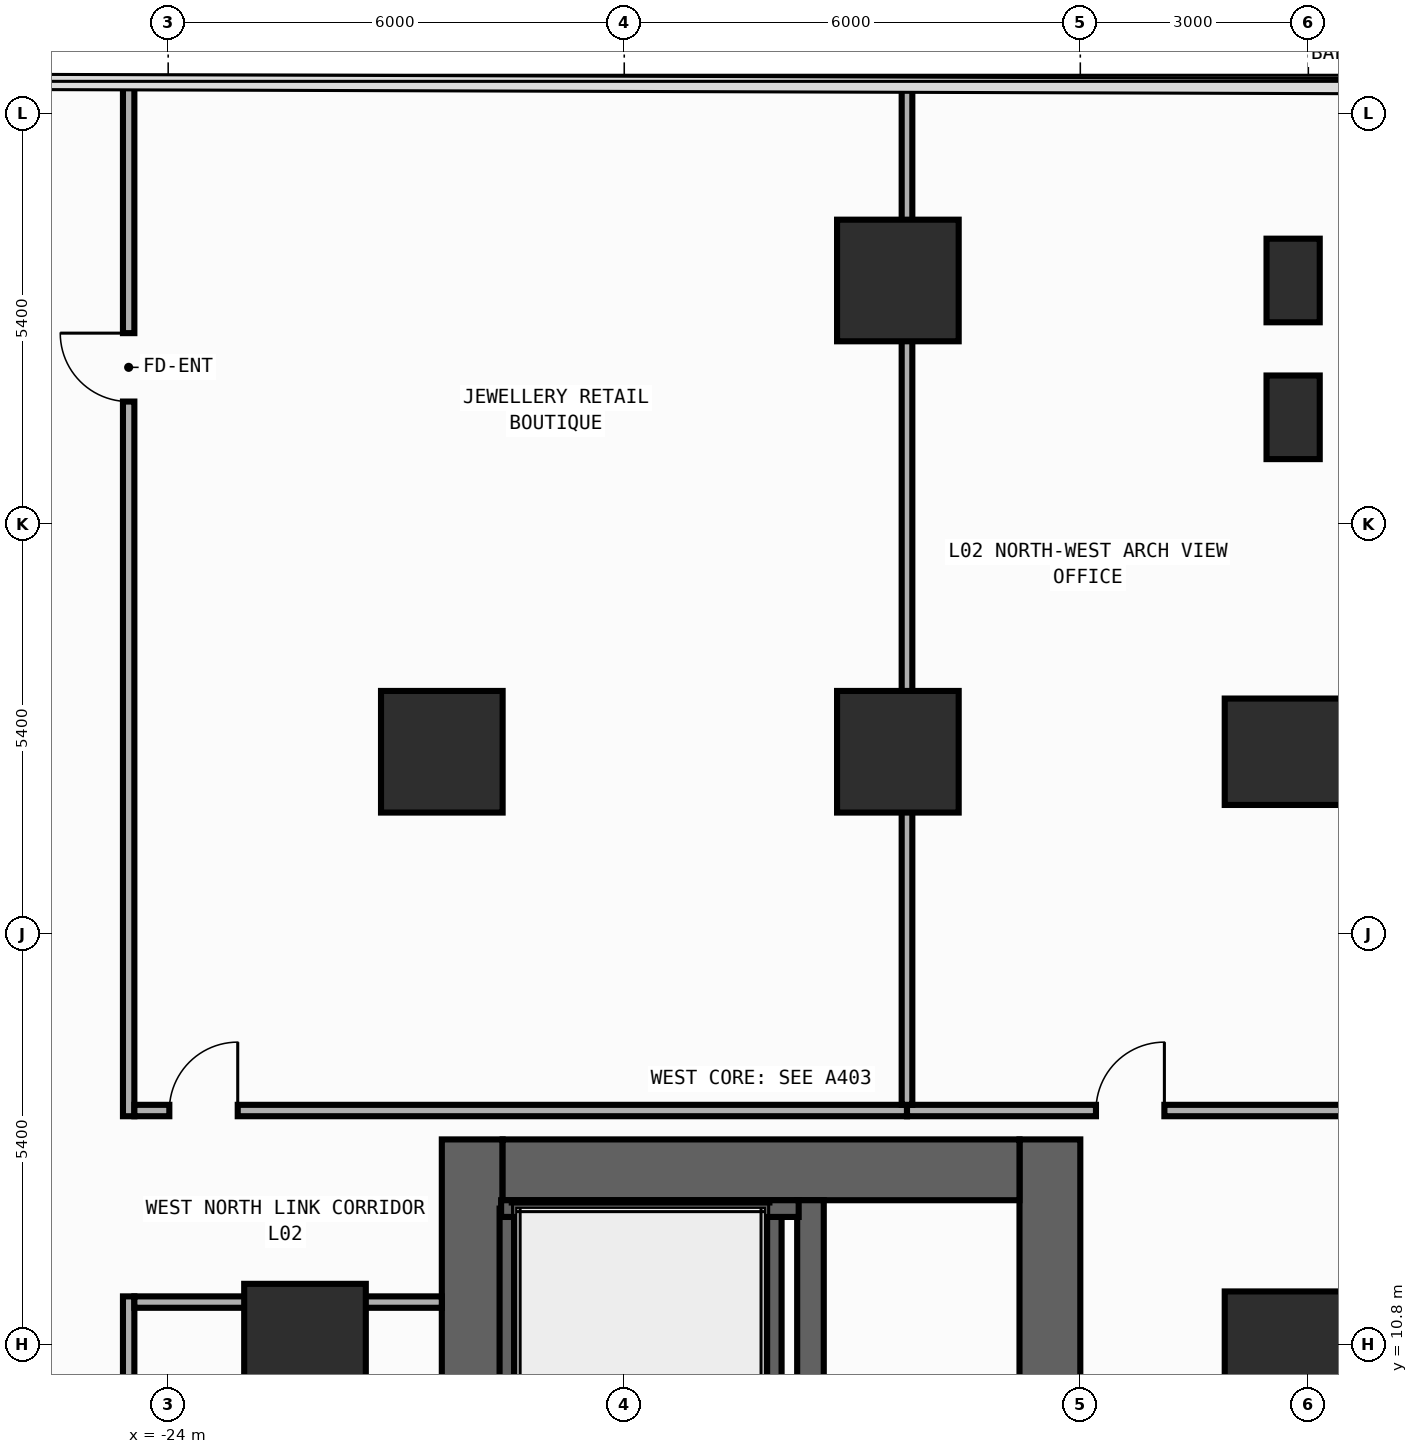
"""IFC4 building model, lengths in metres.
Left out: names, types, materials, properties, quantities, classifications, styles, units other than length and angle.
Written with IfcOpenShell. Run it as: python <this file> out.ifc"""

import sys

from ifc_helpers import new_model, si_unit, direction, frame, frame_2d, origin, origin_2d, place, context, subcontext, project, spatial, rectangle, extrude, element, fill, save


model = new_model("IFC4")
c1 = context("Model", 3, precision=1e-05, world=origin(), true_north=direction((0.0, 1.0)))
c2 = subcontext(c1, "Body", "Model", "MODEL_VIEW")
j1 = project(units=[si_unit("LENGTHUNIT", "METRE"), si_unit("PLANEANGLEUNIT", "RADIAN")], contexts=[c1])
p1 = place(None, origin())
s1 = spatial("IfcSite", under=j1, at=p1, CompositionType="ELEMENT")
p2 = place(p1, origin())
s2 = spatial("IfcBuilding", under=s1, at=p2, CompositionType="ELEMENT")
p3 = place(p2, frame((0.0, 0.0, 6.0)))
s3 = spatial("IfcBuildingStorey", under=s2, at=p3, CompositionType="ELEMENT", Elevation=6.0)
p4 = place(p3, frame((-20.0, -13.5, 0.0), z_axis=(0.0, 0.0, 1.0), x_axis=(0.0, 1.0, 0.0)))
e1 = element("IfcWall", 1, at=p4, inside=s3, PredefinedType="SHEAR", context=c2, shape_type="SweptSolid", body=[
    extrude(rectangle(XDim=27.0, YDim=0.8, at=frame_2d((13.5, 0.0))), origin(), (0.0, 0.0, 1.0), 4.7),
])
p5 = place(p3, frame((-12.4, -13.5, 0.0), z_axis=(0.0, 0.0, 1.0), x_axis=(0.0, 1.0, 0.0)))
e2 = element("IfcWall", 2, at=p5, inside=s3, PredefinedType="SHEAR", context=c2, shape_type="SweptSolid", body=[
    extrude(rectangle(XDim=27.0, YDim=0.8, at=frame_2d((13.5, 0.0))), origin(), (0.0, 0.0, 1.0), 4.7),
])
p6 = place(p5, frame((21.55, 0.0, 0.0)))
e3 = element("IfcOpeningElement", 3, at=p6, cuts=e2, PredefinedType="OPENING", context=c2, shape_type="SweptSolid", body=[
    extrude(rectangle(XDim=1.1, YDim=2.2, at=frame_2d((0.55, 1.1))), frame((0.0, 0.41, 0.0), z_axis=(0.0, -1.0, 0.0), x_axis=(1.0, 0.0, 0.0)), (0.0, 0.0, 1.0), 0.82),
])
p7 = place(p5, frame((18.35, 0.0, 0.0)))
e4 = element("IfcOpeningElement", 4, at=p7, cuts=e2, PredefinedType="OPENING", context=c2, shape_type="SweptSolid", body=[
    extrude(rectangle(XDim=1.1, YDim=2.2, at=frame_2d((0.55, 1.1))), frame((0.0, 0.41, 0.0), z_axis=(0.0, -1.0, 0.0), x_axis=(1.0, 0.0, 0.0)), (0.0, 0.0, 1.0), 0.82),
])
p8 = place(p5, frame((15.15, 0.0, 0.0)))
e5 = element("IfcOpeningElement", 5, at=p8, cuts=e2, PredefinedType="OPENING", context=c2, shape_type="SweptSolid", body=[
    extrude(rectangle(XDim=1.1, YDim=2.2, at=frame_2d((0.55, 1.1))), frame((0.0, 0.41, 0.0), z_axis=(0.0, -1.0, 0.0), x_axis=(1.0, 0.0, 0.0)), (0.0, 0.0, 1.0), 0.82),
])
p9 = place(p5, frame((10.35, 0.0, 0.0)))
e6 = element("IfcOpeningElement", 6, at=p9, cuts=e2, PredefinedType="OPENING", context=c2, shape_type="SweptSolid", body=[
    extrude(rectangle(XDim=1.1, YDim=2.2, at=frame_2d((0.55, 1.1))), frame((0.0, 0.41, 0.0), z_axis=(0.0, -1.0, 0.0), x_axis=(1.0, 0.0, 0.0)), (0.0, 0.0, 1.0), 0.82),
])
p10 = place(p5, frame((7.15, 0.0, 0.0)))
e7 = element("IfcOpeningElement", 7, at=p10, cuts=e2, PredefinedType="OPENING", context=c2, shape_type="SweptSolid", body=[
    extrude(rectangle(XDim=1.1, YDim=2.2, at=frame_2d((0.55, 1.1))), frame((0.0, 0.41, 0.0), z_axis=(0.0, -1.0, 0.0), x_axis=(1.0, 0.0, 0.0)), (0.0, 0.0, 1.0), 0.82),
])
p11 = place(p5, frame((3.95, 0.0, 0.0)))
e8 = element("IfcOpeningElement", 8, at=p11, cuts=e2, PredefinedType="OPENING", context=c2, shape_type="SweptSolid", body=[
    extrude(rectangle(XDim=1.1, YDim=2.2, at=frame_2d((0.55, 1.1))), frame((0.0, 0.41, 0.0), z_axis=(0.0, -1.0, 0.0), x_axis=(1.0, 0.0, 0.0)), (0.0, 0.0, 1.0), 0.82),
])
p12 = place(p5, frame((12.725, 0.0, 0.0)))
e9 = element("IfcOpeningElement", 9, at=p12, cuts=e2, PredefinedType="OPENING", context=c2, shape_type="SweptSolid", body=[
    extrude(rectangle(XDim=1.15, YDim=2.2, at=frame_2d((0.575, 1.1))), frame((0.0, 0.41, 0.0), z_axis=(0.0, -1.0, 0.0), x_axis=(1.0, 0.0, 0.0)), (0.0, 0.0, 1.0), 0.82),
])
p13 = place(p5, frame((1.625, 0.0, 0.0)))
e10 = element("IfcOpeningElement", 10, at=p13, cuts=e2, PredefinedType="OPENING", context=c2, shape_type="SweptSolid", body=[
    extrude(rectangle(XDim=0.85, YDim=2.1, at=frame_2d((0.425, 1.05))), frame((0.0, 0.41, 0.0), z_axis=(0.0, -1.0, 0.0), x_axis=(1.0, 0.0, 0.0)), (0.0, 0.0, 1.0), 0.82),
])
p14 = place(p3, frame((-19.6, 13.1, 0.0), z_axis=(0.0, 0.0, 1.0), x_axis=(1.0, 0.0, 0.0)))
e11 = element("IfcWall", 11, at=p14, inside=s3, PredefinedType="SHEAR", context=c2, shape_type="SweptSolid", body=[
    extrude(rectangle(XDim=6.8, YDim=0.8, at=frame_2d((3.4, 0.0))), origin(), (0.0, 0.0, 1.0), 4.7),
])
p15 = place(p3, frame((-15.55, -12.7, 0.0), z_axis=(0.0, 0.0, 1.0), x_axis=(0.0, 1.0, 0.0)))
e12 = element("IfcWall", 12, at=p15, inside=s3, PredefinedType="SHEAR", context=c2, shape_type="SweptSolid", body=[
    extrude(rectangle(XDim=25.4, YDim=0.35, at=frame_2d((12.7, 0.0))), origin(), (0.0, 0.0, 1.0), 4.7),
])
p16 = place(p15, frame((11.925, 0.0, 0.0)))
e13 = element("IfcOpeningElement", 13, at=p16, cuts=e12, PredefinedType="OPENING", context=c2, shape_type="SweptSolid", body=[
    extrude(rectangle(XDim=1.15, YDim=2.2, at=frame_2d((0.575, 1.1))), frame((0.0, 0.185, 0.0), z_axis=(0.0, -1.0, 0.0), x_axis=(1.0, 0.0, 0.0)), (0.0, 0.0, 1.0), 0.37),
])
p17 = place(p15, frame((0.825, 0.0, 0.0)))
e14 = element("IfcOpeningElement", 14, at=p17, cuts=e12, PredefinedType="OPENING", context=c2, shape_type="SweptSolid", body=[
    extrude(rectangle(XDim=0.85, YDim=2.1, at=frame_2d((0.425, 1.05))), frame((0.0, 0.185, 0.0), z_axis=(0.0, -1.0, 0.0), x_axis=(1.0, 0.0, 0.0)), (0.0, 0.0, 1.0), 0.37),
])
for number, where, z_axis, x_axis in (
    (15, (-16.04, 1.29, 0.0), (0.0, 0.0, 1.0), (0.0, 1.0, 0.0)),
    (16, (-19.53, 1.29, 0.0), (0.0, 0.0, 1.0), (0.0, 1.0, 0.0)),
):
    element("IfcWall", number, at=place(p3, frame(where, z_axis=z_axis, x_axis=x_axis)), inside=s3, PredefinedType="SHEAR", context=c2, shape_type="SweptSolid", body=[
        extrude(rectangle(XDim=11.3, YDim=0.22, at=frame_2d((5.65, 0.0))), origin(), (0.0, 0.0, 1.0), 4.7),
    ])
p18 = place(p3, frame((-19.62, 12.59, 0.0), z_axis=(0.0, 0.0, 1.0), x_axis=(1.0, 0.0, 0.0)))
e17 = element("IfcWall", 17, at=p18, inside=s3, PredefinedType="SHEAR", context=c2, shape_type="SweptSolid", body=[
    extrude(rectangle(XDim=3.915, YDim=0.22, at=frame_2d((1.958, 0.0))), origin(), (0.0, 0.0, 1.0), 4.7),
])
for number, where, z_axis, x_axis in (
    (18, (-9.2, 10.8, 0.0), (0.0, 0.0, 1.0), (1.0, 0.0, 0.0)),
    (19, (-9.2, 18.6, 0.0), (0.0, 0.0, 1.0), (1.0, 0.0, 0.0)),
):
    element("IfcColumn", number, at=place(p3, frame(where, z_axis=z_axis, x_axis=x_axis)), inside=s3, PredefinedType="COLUMN", context=c2, shape_type="SweptSolid", body=[
        extrude(rectangle(XDim=1.8, YDim=1.4, at=origin_2d()), origin(), (0.0, 0.0, 1.0), 5.0),
    ])
for number, where, z_axis, x_axis in (
    (20, (-20.4, 18.6, 0.0), (0.0, 0.0, 1.0), (1.0, 0.0, 0.0)),
    (21, (-14.4, 18.6, 0.0), (0.0, 0.0, 1.0), (1.0, 0.0, 0.0)),
):
    element("IfcColumn", number, at=place(p3, frame(where, z_axis=z_axis, x_axis=x_axis)), inside=s3, PredefinedType="COLUMN", context=c2, shape_type="SweptSolid", body=[
        extrude(rectangle(XDim=1.6, YDim=1.6, at=origin_2d()), origin(), (0.0, 0.0, 1.0), 5.0),
    ])
p19 = place(p3, frame((-9.2, 24.8, 0.0), z_axis=(0.0, 0.0, 1.0), x_axis=(1.0, 0.0, 0.0)))
e22 = element("IfcColumn", 22, at=p19, inside=s3, PredefinedType="PILASTER", context=c2, shape_type="SweptSolid", body=[
    extrude(rectangle(XDim=0.7, YDim=1.1, at=origin_2d()), origin(), (0.0, 0.0, 1.0), 5.0),
])
for number, where, z_axis, x_axis in (
    (23, (-22.2, 10.8, 0.0), (0.0, 0.0, 1.0), (1.0, 0.0, 0.0)),
    (24, (-14.4, 24.8, 0.0), (0.0, 0.0, 1.0), (1.0, 0.0, 0.0)),
):
    element("IfcColumn", number, at=place(p3, frame(where, z_axis=z_axis, x_axis=x_axis)), inside=s3, PredefinedType="COLUMN", context=c2, shape_type="SweptSolid", body=[
        extrude(rectangle(XDim=1.6, YDim=1.6, at=origin_2d()), origin(), (0.0, 0.0, 1.0), 5.0),
    ])
p20 = place(p3, frame((-9.2, 23.0, 0.0), z_axis=(0.0, 0.0, 1.0), x_axis=(1.0, 0.0, 0.0)))
e25 = element("IfcColumn", 25, at=p20, inside=s3, PredefinedType="PILASTER", context=c2, shape_type="SweptSolid", body=[
    extrude(rectangle(XDim=0.7, YDim=1.1, at=origin_2d()), origin(), (0.0, 0.0, 1.0), 5.0),
])
p21 = place(p3, frame((-24.52, 13.805, 0.0), z_axis=(0.0, 0.0, 1.0), x_axis=(0.0, 1.0, 0.0)))
e26 = element("IfcWall", 26, at=p21, inside=s3, PredefinedType="PARTITIONING", context=c2, shape_type="SweptSolid", body=[
    extrude(rectangle(XDim=13.608, YDim=0.15, at=frame_2d((6.804, 0.0))), origin(), (0.0, 0.0, 1.0), 4.7),
])
p22 = place(p21, frame((9.402, 0.0, 0.0)))
e27 = element("IfcOpeningElement", 27, at=p22, cuts=e26, PredefinedType="OPENING", context=c2, shape_type="SweptSolid", body=[
    extrude(rectangle(XDim=0.9, YDim=2.15, at=frame_2d((0.45, 1.075))), frame((0.0, 0.085, 0.0), z_axis=(0.0, -1.0, 0.0), x_axis=(1.0, 0.0, 0.0)), (0.0, 0.0, 1.0), 0.17),
])
p23 = place(p3, frame((-24.52, -13.795, 0.0), z_axis=(0.0, 0.0, 1.0), x_axis=(0.0, 1.0, 0.0)))
e28 = element("IfcWall", 28, at=p23, inside=s3, PredefinedType="PARTITIONING", context=c2, shape_type="SweptSolid", body=[
    extrude(rectangle(XDim=25.23, YDim=0.15, at=frame_2d((12.615, 0.0))), origin(), (0.0, 0.0, 1.0), 4.7),
])
p24 = place(p23, frame((7.863, 0.0, 0.0)))
e29 = element("IfcOpeningElement", 29, at=p24, cuts=e28, PredefinedType="OPENING", context=c2, shape_type="SweptSolid", body=[
    extrude(rectangle(XDim=0.9, YDim=2.15, at=frame_2d((0.45, 1.075))), frame((0.0, 0.085, 0.0), z_axis=(0.0, -1.0, 0.0), x_axis=(1.0, 0.0, 0.0)), (0.0, 0.0, 1.0), 0.17),
])
p25 = place(p3, frame((-24.445, 13.88, 0.0), z_axis=(0.0, 0.0, 1.0), x_axis=(1.0, 0.0, 0.0)))
e30 = element("IfcWall", 30, at=p25, inside=s3, PredefinedType="PARTITIONING", context=c2, shape_type="SweptSolid", body=[
    extrude(rectangle(XDim=10.165, YDim=0.15, at=frame_2d((5.083, 0.0))), origin(), (0.0, 0.0, 1.0), 4.7),
])
p26 = place(p25, frame((0.46, 0.0, 0.0)))
e31 = element("IfcOpeningElement", 31, at=p26, cuts=e30, PredefinedType="OPENING", context=c2, shape_type="SweptSolid", body=[
    extrude(rectangle(XDim=0.9, YDim=2.15, at=frame_2d((0.45, 1.075))), frame((0.0, 0.085, 0.0), z_axis=(0.0, -1.0, 0.0), x_axis=(1.0, 0.0, 0.0)), (0.0, 0.0, 1.0), 0.17),
])
p27 = place(p3, frame((-24.445, 11.36, 0.0), z_axis=(0.0, 0.0, 1.0), x_axis=(1.0, 0.0, 0.0)))
e32 = element("IfcWall", 32, at=p27, inside=s3, PredefinedType="PARTITIONING", context=c2, shape_type="SweptSolid", body=[
    extrude(rectangle(XDim=4.045, YDim=0.15, at=frame_2d((2.022, 0.0))), origin(), (0.0, 0.0, 1.0), 4.7),
])
p28 = place(p3, frame((-14.28, 13.88, 0.0), z_axis=(0.0, 0.0, 1.0), x_axis=(1.0, 0.0, 0.0)))
e33 = element("IfcWall", 33, at=p28, inside=s3, PredefinedType="PARTITIONING", context=c2, shape_type="SweptSolid", body=[
    extrude(rectangle(XDim=6.075, YDim=0.15, at=frame_2d((3.038, 0.0))), origin(), (0.0, 0.0, 1.0), 4.7),
])
p29 = place(p28, frame((2.486, 0.0, 0.0)))
e34 = element("IfcOpeningElement", 34, at=p29, cuts=e33, PredefinedType="OPENING", context=c2, shape_type="SweptSolid", body=[
    extrude(rectangle(XDim=0.9, YDim=2.15, at=frame_2d((0.45, 1.075))), frame((0.0, 0.085, 0.0), z_axis=(0.0, -1.0, 0.0), x_axis=(1.0, 0.0, 0.0)), (0.0, 0.0, 1.0), 0.17),
])
p30 = place(p3, frame((-14.28, 13.955, 0.0), z_axis=(0.0, 0.0, 1.0), x_axis=(0.0, 1.0, 0.0)))
e35 = element("IfcWall", 35, at=p30, inside=s3, PredefinedType="PARTITIONING", context=c2, shape_type="SweptSolid", body=[
    extrude(rectangle(XDim=13.425, YDim=0.14, at=frame_2d((6.713, 0.0))), origin(), (0.0, 0.0, 1.0), 3.8),
])
p31 = place(p22, origin())
e36 = element("IfcDoor", 36, at=p31, inside=s3, OperationType="SINGLE_SWING_RIGHT", PredefinedType="DOOR", context=c2, shape_type="SweptSolid", body=[
    extrude(rectangle(XDim=0.9, YDim=2.15, at=frame_2d((0.45, 1.075))), frame((0.0, 0.025, 0.0), z_axis=(0.0, -1.0, 0.0), x_axis=(1.0, 0.0, 0.0)), (0.0, 0.0, 1.0), 0.05),
])
fill(e27, e36)
p32 = place(p26, origin())
e37 = element("IfcDoor", 37, at=p32, inside=s3, OperationType="SINGLE_SWING_RIGHT", PredefinedType="DOOR", context=c2, shape_type="SweptSolid", body=[
    extrude(rectangle(XDim=0.9, YDim=2.15, at=frame_2d((0.45, 1.075))), frame((0.0, 0.025, 0.0), z_axis=(0.0, -1.0, 0.0), x_axis=(1.0, 0.0, 0.0)), (0.0, 0.0, 1.0), 0.05),
])
fill(e31, e37)
p33 = place(p29, origin())
e38 = element("IfcDoor", 38, at=p33, inside=s3, OperationType="SINGLE_SWING_RIGHT", PredefinedType="DOOR", context=c2, shape_type="SweptSolid", body=[
    extrude(rectangle(XDim=0.9, YDim=2.15, at=frame_2d((0.45, 1.075))), frame((0.0, 0.025, 0.0), z_axis=(0.0, -1.0, 0.0), x_axis=(1.0, 0.0, 0.0)), (0.0, 0.0, 1.0), 0.05),
])
fill(e34, e38)
save(model, sys.argv[1])
